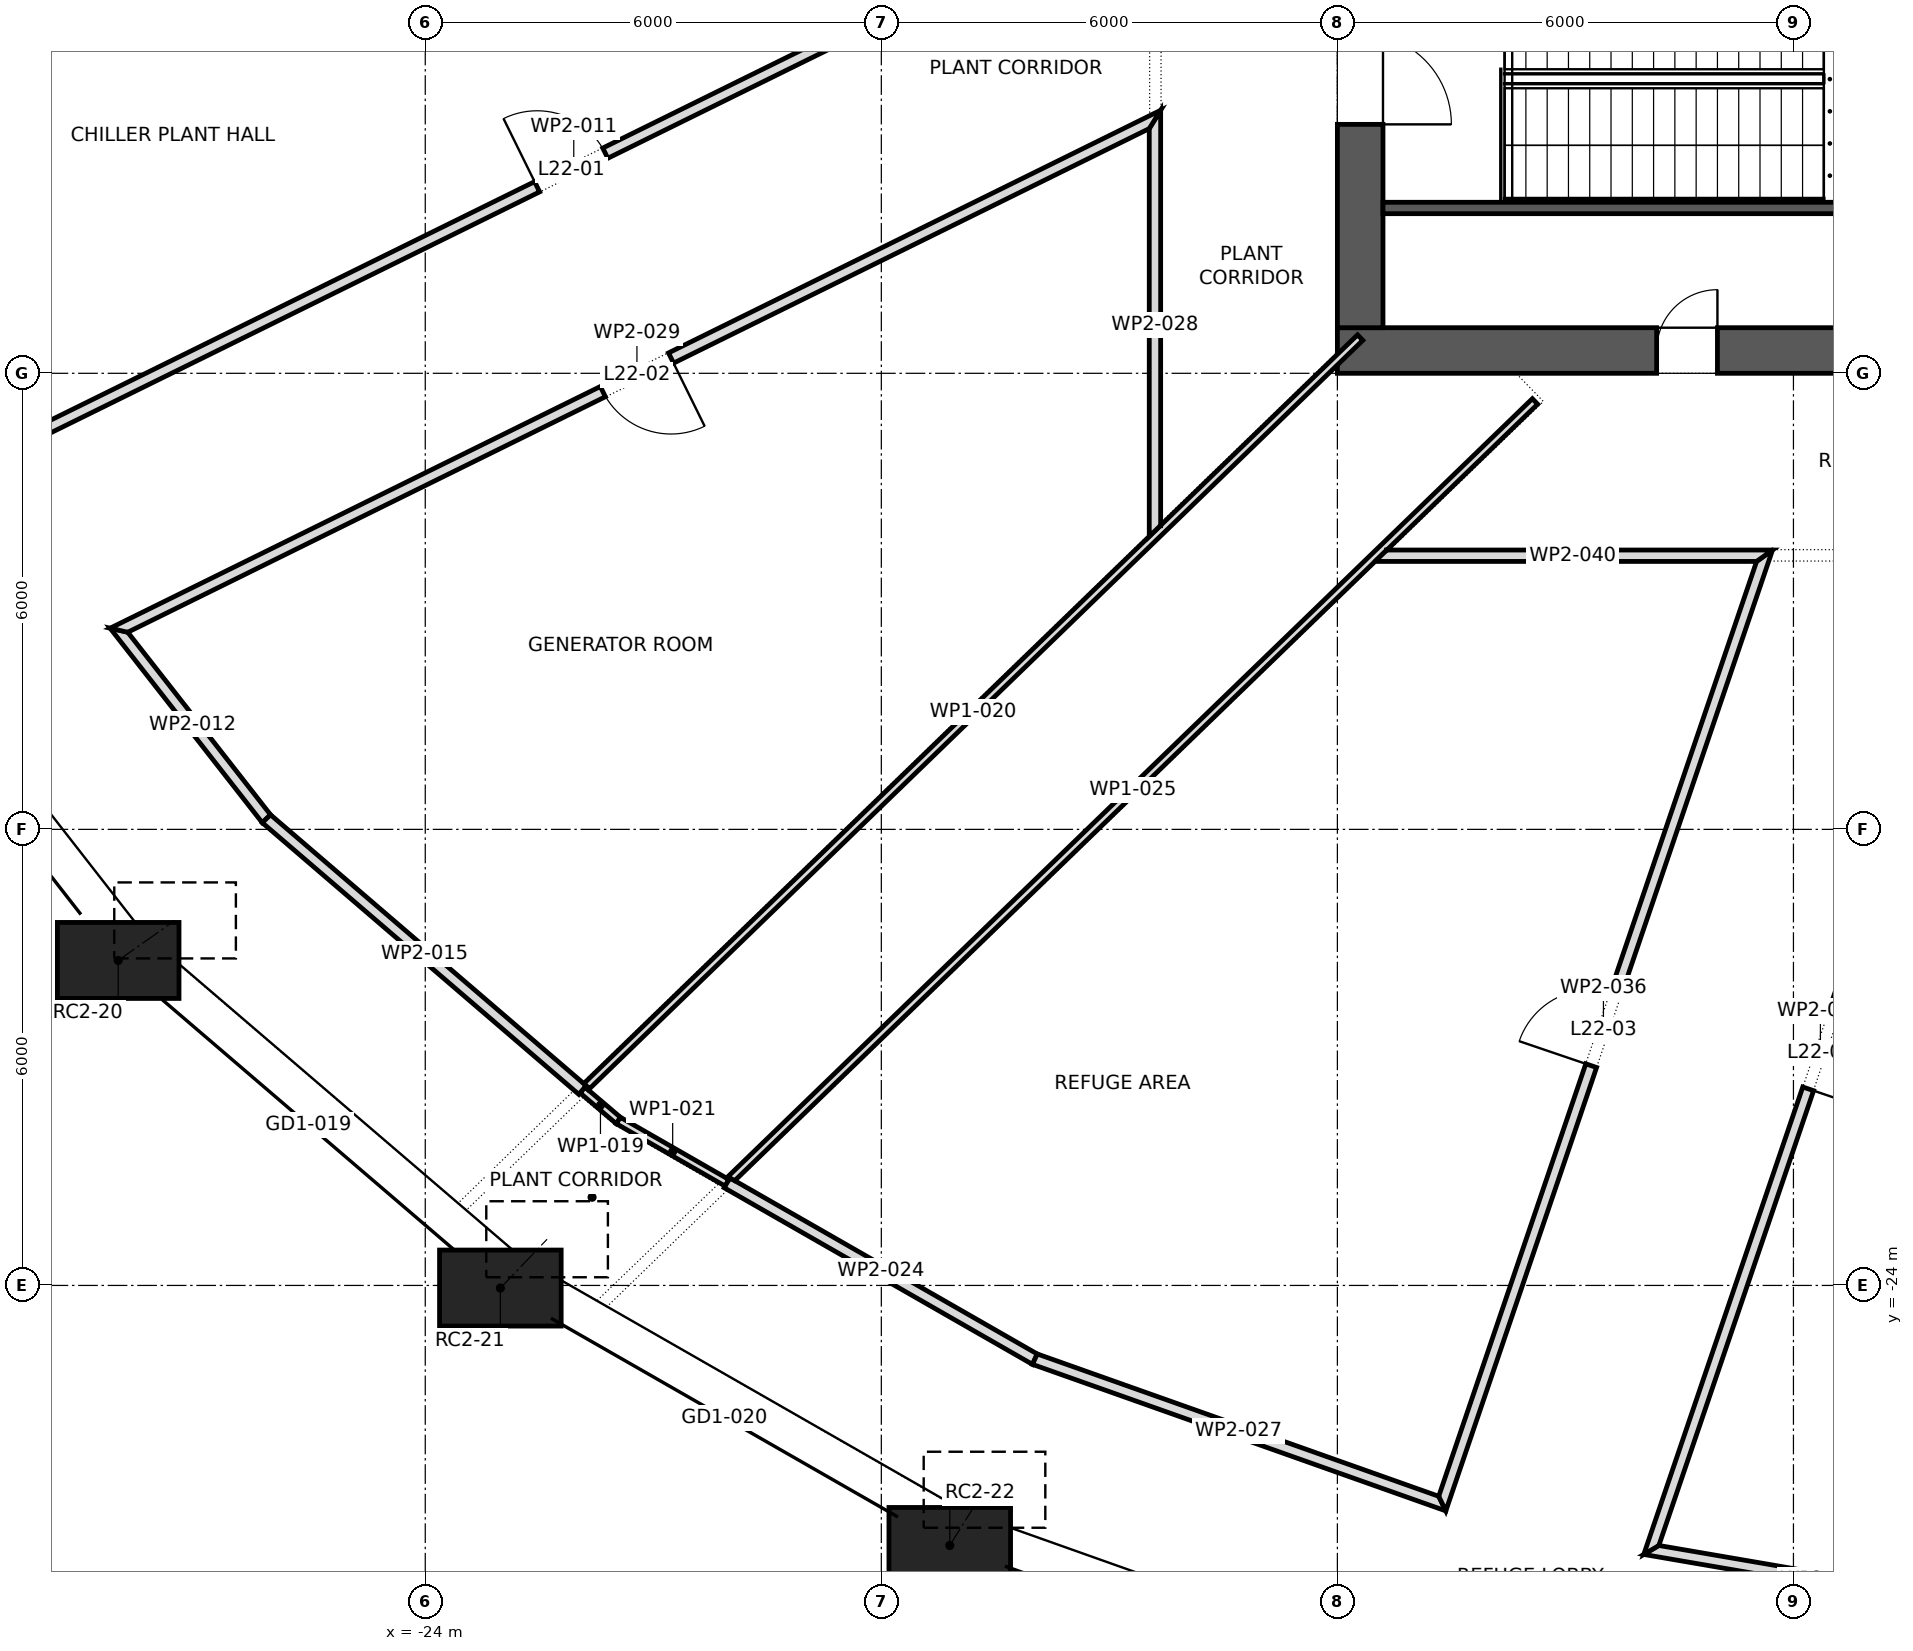
"""IFC4 building model, lengths in metres.
Left out: names, types, materials, properties, quantities, classifications, styles, units other than length and angle.
Written with IfcOpenShell. Run it as: python <this file> out.ifc"""

import sys

from ifc_helpers import new_model, si_unit, direction, frame, frame_2d, origin, origin_2d, place, context, subcontext, project, spatial, polyline, rectangle, outline, extrude, element, fill, save


model = new_model("IFC4")
c1 = context("Model", 3, precision=1e-05, world=origin(), true_north=direction((0.0, 1.0)))
c2 = subcontext(c1, "Body", "Model", "MODEL_VIEW")
j1 = project(units=[si_unit("LENGTHUNIT", "METRE"), si_unit("PLANEANGLEUNIT", "RADIAN")], contexts=[c1])
p1 = place(None, origin())
s1 = spatial("IfcSite", under=j1, at=p1, CompositionType="ELEMENT")
p2 = place(p1, origin())
s2 = spatial("IfcBuilding", under=s1, at=p2, CompositionType="ELEMENT")
p3 = place(p2, frame((0.0, 0.0, 99.1)))
s3 = spatial("IfcBuildingStorey", under=s2, at=p3, CompositionType="ELEMENT", Elevation=99.1)
p4 = place(p3, frame((-28.04, -19.724, 0.086), z_axis=(0.140981797412, 0.099170230088, 0.985032688931), x_axis=(-0.575341361803, 0.817913392358, 0.0)))
e1 = element("IfcColumn", 1, at=p4, inside=s3, PredefinedType="COLUMN", context=c2, shape_type="SweptSolid", body=[
    extrude(rectangle(XDim=1.6, YDim=1.0, at=origin_2d()), origin(), (0.0, 0.0, 1.0), 5.308),
])
p5 = place(p3, frame((-23.012, -24.034, 0.083), z_axis=(0.115812481815, 0.12096379157, 0.985877898213), x_axis=(-0.722319686129, 0.691559304059, 0.0)))
e2 = element("IfcColumn", 2, at=p5, inside=s3, PredefinedType="COLUMN", context=c2, shape_type="SweptSolid", body=[
    extrude(rectangle(XDim=1.6, YDim=1.0, at=origin_2d()), origin(), (0.0, 0.0, 1.0), 5.308),
])
p6 = place(p3, frame((-17.1, -27.421, 0.081), z_axis=(0.08609317292, 0.138107798226, 0.986668232815), x_axis=(-0.848616882571, 0.529007926798, 0.0)))
e3 = element("IfcColumn", 3, at=p6, inside=s3, PredefinedType="COLUMN", context=c2, shape_type="SweptSolid", body=[
    extrude(rectangle(XDim=1.6, YDim=1.0, at=origin_2d()), origin(), (0.0, 0.0, 1.0), 5.309),
])
p7 = place(p3, frame((-12.0, -11.7, 0.0), z_axis=(0.0, 0.0, 1.0), x_axis=(1.0, 0.0, 0.0)))
e4 = element("IfcWall", 4, at=p7, inside=s3, PredefinedType="SHEAR", context=c2, shape_type="SweptSolid", body=[
    extrude(rectangle(XDim=24.0, YDim=0.6, at=frame_2d((12.0, 0.0))), origin(), (0.0, 0.0, 1.0), 5.4),
])
p8 = place(p7, frame((10.025, 0.0, 0.0)))
e5 = element("IfcOpeningElement", 5, at=p8, cuts=e4, PredefinedType="OPENING", context=c2, shape_type="SweptSolid", body=[
    extrude(rectangle(XDim=0.8, YDim=2.1, at=frame_2d((0.4, 1.05))), frame((0.0, 0.312, 0.0), z_axis=(0.0, -1.0, 0.0), x_axis=(1.0, 0.0, 0.0)), (0.0, 0.0, 1.0), 0.624),
])
p9 = place(p7, frame((4.2, 0.0, 0.0)))
e6 = element("IfcOpeningElement", 6, at=p9, cuts=e4, PredefinedType="OPENING", context=c2, shape_type="SweptSolid", body=[
    extrude(rectangle(XDim=0.8, YDim=2.1, at=frame_2d((0.4, 1.05))), frame((0.0, 0.312, 0.0), z_axis=(0.0, -1.0, 0.0), x_axis=(1.0, 0.0, 0.0)), (0.0, 0.0, 1.0), 0.624),
])
p10 = place(p7, frame((15.85, 0.0, 0.0)))
e7 = element("IfcOpeningElement", 7, at=p10, cuts=e4, PredefinedType="OPENING", context=c2, shape_type="SweptSolid", body=[
    extrude(rectangle(XDim=0.8, YDim=2.1, at=frame_2d((0.4, 1.05))), frame((0.0, 0.312, 0.0), z_axis=(0.0, -1.0, 0.0), x_axis=(1.0, 0.0, 0.0)), (0.0, 0.0, 1.0), 0.624),
])
p11 = place(p3, frame((-11.7, -11.4, 0.0), z_axis=(0.0, 0.0, 1.0), x_axis=(0.0, 1.0, 0.0)))
e8 = element("IfcWall", 8, at=p11, inside=s3, PredefinedType="SHEAR", context=c2, shape_type="SweptSolid", body=[
    extrude(rectangle(XDim=22.8, YDim=0.6, at=frame_2d((11.4, 0.0))), origin(), (0.0, 0.0, 1.0), 5.4),
])
p12 = place(p11, frame((10.2, 0.0, 0.0)))
e9 = element("IfcOpeningElement", 9, at=p12, cuts=e8, PredefinedType="OPENING", context=c2, shape_type="SweptSolid", body=[
    extrude(rectangle(XDim=2.4, YDim=2.1, at=frame_2d((1.2, 1.05))), frame((0.0, 0.312, 0.0), z_axis=(0.0, -1.0, 0.0), x_axis=(1.0, 0.0, 0.0)), (0.0, 0.0, 1.0), 0.624),
])
p13 = place(p11, frame((18.925, 0.0, 0.0)))
e10 = element("IfcOpeningElement", 10, at=p13, cuts=e8, PredefinedType="OPENING", context=c2, shape_type="SweptSolid", body=[
    extrude(rectangle(XDim=1.2, YDim=2.1, at=frame_2d((0.6, 1.05))), frame((0.0, 0.312, 0.0), z_axis=(0.0, -1.0, 0.0), x_axis=(1.0, 0.0, 0.0)), (0.0, 0.0, 1.0), 0.624),
])
p14 = place(p11, frame((2.675, 0.0, 0.0)))
e11 = element("IfcOpeningElement", 11, at=p14, cuts=e8, PredefinedType="OPENING", context=c2, shape_type="SweptSolid", body=[
    extrude(rectangle(XDim=1.2, YDim=2.1, at=frame_2d((0.6, 1.05))), frame((0.0, 0.312, 0.0), z_axis=(0.0, -1.0, 0.0), x_axis=(1.0, 0.0, 0.0)), (0.0, 0.0, 1.0), 0.624),
])
p15 = place(p3, frame((-11.4, -9.825, 0.0), z_axis=(0.0, 0.0, 1.0), x_axis=(1.0, 0.0, 0.0)))
e12 = element("IfcWall", 12, at=p15, inside=s3, PredefinedType="SHEAR", context=c2, shape_type="SweptSolid", body=[
    extrude(rectangle(XDim=8.0, YDim=0.15, at=frame_2d((4.0, 0.0))), origin(), (0.0, 0.0, 1.0), 5.1),
])
p16 = place(p3, frame((-29.828, -13.143, 0.0), z_axis=(0.0, 0.0, 1.0), x_axis=(0.896984577942, 0.442061836098, 0.0)))
e13 = element("IfcWall", 13, at=p16, inside=s3, PredefinedType="PARTITIONING", context=c2, shape_type="SweptSolid", body=[
    extrude(outline(polyline([(17.275, 0.075), (15.372, 0.075), (13.469, 0.075), (11.567, 0.075), (9.664, 0.075), (7.762, 0.075), (5.859, 0.075), (3.957, 0.075), (2.054, 0.075), (0.151, 0.075), (0.0, -0.075), (1.919, -0.075), (3.839, -0.075), (5.758, -0.075), (7.678, -0.075), (9.597, -0.075), (11.517, -0.075), (13.436, -0.075), (15.355, -0.075), (17.275, -0.075), (17.275, 0.075)])), origin(), (0.0, 0.0, 1.0), 5.1),
])
p17 = place(p16, frame((8.138, 0.0, 0.0)))
e14 = element("IfcOpeningElement", 14, at=p17, cuts=e13, PredefinedType="OPENING", context=c2, shape_type="SweptSolid", body=[
    extrude(rectangle(XDim=1.0, YDim=2.1, at=frame_2d((0.5, 1.05))), frame((0.0, 0.087, 0.0), z_axis=(0.0, -1.0, 0.0), x_axis=(1.0, 0.0, 0.0)), (0.0, 0.0, 1.0), 0.174),
])
p18 = place(p3, frame((-28.087, -15.307, 0.0), z_axis=(0.0, 0.0, 1.0), x_axis=(0.616133967793, -0.787641373807, 0.0)))
e15 = element("IfcWall", 15, at=p18, inside=s3, PredefinedType="PARTITIONING", context=c2, shape_type="SweptSolid", body=[
    extrude(outline(polyline([(0.0, -0.075), (1.624, -0.075), (3.248, -0.075), (3.233, 0.075), (1.709, 0.075), (0.184, 0.075), (0.0, -0.075), (0.0, -0.075)])), origin(), (0.0, 0.0, 1.0), 5.1),
])
p19 = place(p3, frame((-26.096, -17.855, 0.0), z_axis=(0.0, 0.0, 1.0), x_axis=(0.758892304341, -0.651216147229, 0.0)))
e16 = element("IfcWall", 16, at=p19, inside=s3, PredefinedType="PARTITIONING", context=c2, shape_type="SweptSolid", body=[
    extrude(outline(polyline([(5.489, 0.075), (3.665, 0.075), (1.84, 0.075), (0.015, 0.075), (0.0, -0.075), (0.0, -0.075), (1.83, -0.075), (3.659, -0.075), (5.489, -0.075), (5.489, 0.075)])), origin(), (0.0, 0.0, 1.0), 5.1),
])
p20 = place(p3, frame((-21.93, -21.43, 0.0), z_axis=(0.0, 0.0, 1.0), x_axis=(0.761386795388, -0.648297885088, 0.0)))
e17 = element("IfcWall", 17, at=p20, inside=s3, PredefinedType="PARTITIONING", context=c2, shape_type="SweptSolid", body=[
    extrude(outline(polyline([(0.0, -0.05), (0.622, -0.05), (0.613, 0.05), (0.0, 0.05), (0.0, -0.05)])), origin(), (0.0, 0.0, 1.0), 5.1),
])
p21 = place(p3, frame((-21.89, -21.391, 0.0), z_axis=(0.0, 0.0, 1.0), x_axis=(0.718607137454, 0.695416265269, 0.0)))
e18 = element("IfcWall", 18, at=p21, inside=s3, PredefinedType="PARTITIONING", context=c2, shape_type="SweptSolid", body=[
    extrude(outline(polyline([(14.18, 0.05), (12.378, 0.05), (10.576, 0.05), (10.573, 0.047), (10.57, 0.05), (8.811, 0.05), (7.052, 0.05), (5.292, 0.05), (3.533, 0.05), (1.774, 0.05), (0.015, 0.05), (0.019, 0.007), (0.0, 0.005), (0.0, -0.05), (1.772, -0.05), (3.545, -0.05), (5.318, -0.05), (7.09, -0.05), (8.863, -0.05), (10.635, -0.05), (12.408, -0.05), (14.18, -0.05), (14.18, 0.05)])), origin(), (0.0, 0.0, 1.0), 5.1),
])
p22 = place(p3, frame((-21.464, -21.828, 0.0), z_axis=(0.0, 0.0, 1.0), x_axis=(0.867515133923, -0.497410788398, 0.0)))
e19 = element("IfcWall", 19, at=p22, inside=s3, PredefinedType="PARTITIONING", context=c2, shape_type="SweptSolid", body=[
    extrude(outline(polyline([(1.653, 0.05), (0.009, 0.05), (0.0, -0.05), (1.653, -0.05), (1.653, 0.05)])), origin(), (0.0, 0.0, 1.0), 5.1),
])
p23 = place(p3, frame((-20.03, -22.65, 0.0), z_axis=(0.0, 0.0, 1.0), x_axis=(0.867705864806, -0.497077994062, 0.0)))
e20 = element("IfcWall", 20, at=p23, inside=s3, PredefinedType="PARTITIONING", context=c2, shape_type="SweptSolid", body=[
    extrude(outline(polyline([(0.0, -0.075), (1.558, -0.075), (3.116, -0.075), (4.674, -0.075), (4.661, 0.075), (3.107, 0.075), (1.553, 0.075), (0.0, 0.075), (0.0, -0.075)])), origin(), (0.0, 0.0, 1.0), 5.1),
])
p24 = place(p3, frame((-20.003, -22.624, 0.0), z_axis=(0.0, 0.0, 1.0), x_axis=(0.718850780889, 0.695164408478, 0.0)))
e21 = element("IfcWall", 21, at=p24, inside=s3, PredefinedType="PARTITIONING", context=c2, shape_type="SweptSolid", body=[
    extrude(outline(polyline([(0.054, -0.05), (2.043, -0.05), (4.031, -0.05), (6.02, -0.05), (8.008, -0.05), (9.997, -0.05), (11.985, -0.05), (11.987, -0.048), (11.989, -0.05), (13.369, -0.05), (14.75, -0.05), (14.75, 0.05), (12.906, 0.05), (11.062, 0.05), (9.219, 0.05), (7.375, 0.05), (5.531, 0.05), (3.688, 0.05), (1.844, 0.05), (0.0, 0.05), (0.0, 0.049), (0.01, 0.014), (0.034, 0.021), (0.054, -0.05)])), origin(), (0.0, 0.0, 1.0), 5.1),
])
p25 = place(p3, frame((-15.986, -24.968, 0.0), z_axis=(0.0, 0.0, 1.0), x_axis=(0.94253008703, -0.334121287923, 0.0)))
e22 = element("IfcWall", 22, at=p25, inside=s3, PredefinedType="PARTITIONING", context=c2, shape_type="SweptSolid", body=[
    extrude(outline(polyline([(0.0, -0.075), (1.923, -0.075), (3.846, -0.075), (5.77, -0.075), (5.618, 0.075), (3.75, 0.075), (1.882, 0.075), (0.013, 0.075), (0.0, -0.074), (0.0, -0.075)])), origin(), (0.0, 0.0, 1.0), 5.1),
])
p26 = place(p3, frame((-14.4, -14.147, 0.0), z_axis=(0.0, 0.0, 1.0), x_axis=(0.0, 1.0, 0.0)))
e23 = element("IfcWall", 23, at=p26, inside=s3, PredefinedType="PARTITIONING", context=c2, shape_type="SweptSolid", body=[
    extrude(outline(polyline([(0.146, -0.075), (1.967, -0.075), (3.787, -0.075), (5.608, -0.075), (5.487, 0.0), (5.367, 0.075), (3.578, 0.075), (1.79, 0.075), (0.001, 0.075), (0.146, -0.075)])), origin(), (0.0, 0.0, 1.0), 5.1),
])
p27 = place(p3, frame((-14.292, -8.607, 0.0), z_axis=(0.0, 0.0, 1.0), x_axis=(-0.896913310142, -0.442206415703, 0.0)))
e24 = element("IfcWall", 24, at=p27, inside=s3, PredefinedType="PARTITIONING", context=c2, shape_type="SweptSolid", body=[
    extrude(outline(polyline([(0.0, -0.075), (1.926, -0.075), (3.853, -0.075), (5.779, -0.075), (7.705, -0.075), (9.631, -0.075), (11.557, -0.075), (13.483, -0.075), (15.409, -0.075), (15.225, 0.075), (13.352, 0.075), (11.479, 0.075), (9.606, 0.075), (7.733, 0.075), (5.86, 0.075), (3.987, 0.075), (2.114, 0.075), (0.241, 0.075), (0.0, -0.075)])), origin(), (0.0, 0.0, 1.0), 5.1),
])
p28 = place(p27, frame((7.219, 0.0, 0.0)))
e25 = element("IfcOpeningElement", 25, at=p28, cuts=e24, PredefinedType="OPENING", context=c2, shape_type="SweptSolid", body=[
    extrude(rectangle(XDim=1.0, YDim=2.1, at=frame_2d((0.5, 1.05))), frame((0.0, 0.087, 0.0), z_axis=(0.0, -1.0, 0.0), x_axis=(1.0, 0.0, 0.0)), (0.0, 0.0, 1.0), 0.174),
])
p29 = place(p3, frame((-10.645, -26.942, 0.0), z_axis=(0.0, 0.0, 1.0), x_axis=(0.321926990849, 0.946764496886, 0.0)))
e26 = element("IfcWall", 26, at=p29, inside=s3, PredefinedType="PARTITIONING", context=c2, shape_type="SweptSolid", body=[
    extrude(outline(polyline([(13.352, -0.075), (13.352, -0.075), (13.143, 0.075), (11.287, 0.075), (9.431, 0.075), (7.575, 0.075), (5.719, 0.075), (3.864, 0.075), (2.008, 0.075), (0.152, 0.075), (0.0, -0.075), (1.907, -0.075), (3.815, -0.075), (5.722, -0.075), (7.63, -0.075), (9.537, -0.075), (11.444, -0.075), (13.352, -0.075)])), origin(), (0.0, 0.0, 1.0), 5.1),
])
p30 = place(p29, frame((6.162, 0.0, 0.0)))
e27 = element("IfcOpeningElement", 27, at=p30, cuts=e26, PredefinedType="OPENING", context=c2, shape_type="SweptSolid", body=[
    extrude(rectangle(XDim=1.0, YDim=2.1, at=frame_2d((0.5, 1.05))), frame((0.0, 0.087, 0.0), z_axis=(0.0, -1.0, 0.0), x_axis=(1.0, 0.0, 0.0)), (0.0, 0.0, 1.0), 0.174),
])
p31 = place(p3, frame((-7.957, -27.465, 0.0), z_axis=(0.0, 0.0, 1.0), x_axis=(0.985561893729, -0.169315544559, 0.0)))
e28 = element("IfcWall", 28, at=p31, inside=s3, PredefinedType="PARTITIONING", context=c2, shape_type="SweptSolid", body=[
    extrude(outline(polyline([(4.701, -0.075), (4.701, -0.074), (4.688, 0.075), (3.184, 0.075), (1.68, 0.075), (0.176, 0.075), (0.0, -0.075), (1.567, -0.075), (3.134, -0.075), (4.701, -0.075)])), origin(), (0.0, 0.0, 1.0), 5.1),
])
p32 = place(p3, frame((-6.275, -14.4, 0.0), z_axis=(0.0, 0.0, 1.0), x_axis=(-1.0, 0.0, 0.0)))
e29 = element("IfcWall", 29, at=p32, inside=s3, PredefinedType="PARTITIONING", context=c2, shape_type="SweptSolid", body=[
    extrude(outline(polyline([(0.0, -0.075), (1.691, -0.075), (3.383, -0.075), (5.074, -0.075), (5.229, 0.075), (5.229, 0.075), (3.556, 0.075), (1.882, 0.075), (0.209, 0.075), (0.104, 0.0), (0.0, -0.075), (0.0, -0.075)])), origin(), (0.0, 0.0, 1.0), 5.1),
])
p33 = place(p3, frame((-3.403, -14.349, 0.0), z_axis=(0.0, 0.0, 1.0), x_axis=(-0.32208303293, -0.946711423771, 0.0)))
e30 = element("IfcWall", 30, at=p33, inside=s3, PredefinedType="PARTITIONING", context=c2, shape_type="SweptSolid", body=[
    extrude(outline(polyline([(0.0, -0.075), (1.994, -0.075), (3.988, -0.075), (5.982, -0.075), (7.976, -0.075), (9.97, -0.075), (11.964, -0.075), (13.958, -0.075), (13.782, 0.075), (11.829, 0.075), (9.875, 0.075), (7.922, 0.075), (5.968, 0.075), (4.015, 0.075), (2.061, 0.075), (0.107, 0.075), (0.0, -0.075)])), origin(), (0.0, 0.0, 1.0), 5.1),
])
p34 = place(p33, frame((6.462, 0.0, 0.0)))
e31 = element("IfcOpeningElement", 31, at=p34, cuts=e30, PredefinedType="OPENING", context=c2, shape_type="SweptSolid", body=[
    extrude(rectangle(XDim=1.0, YDim=2.1, at=frame_2d((0.5, 1.05))), frame((0.0, 0.087, 0.0), z_axis=(0.0, -1.0, 0.0), x_axis=(1.0, 0.0, 0.0)), (0.0, 0.0, 1.0), 0.174),
])
p35 = place(p14, frame((1.2, 0.0, 0.0), z_axis=(0.0, 0.0, 1.0), x_axis=(-1.0, 0.0, 0.0)))
e32 = element("IfcDoor", 32, at=p35, inside=s3, OperationType="SINGLE_SWING_LEFT", PredefinedType="DOOR", context=c2, shape_type="SweptSolid", body=[
    extrude(rectangle(XDim=1.2, YDim=2.1, at=frame_2d((0.6, 1.05))), frame((0.0, 0.025, 0.0), z_axis=(0.0, -1.0, 0.0), x_axis=(1.0, 0.0, 0.0)), (0.0, 0.0, 1.0), 0.05),
])
fill(e11, e32)
p36 = place(p9, origin())
e33 = element("IfcDoor", 33, at=p36, inside=s3, OperationType="SINGLE_SWING_LEFT", PredefinedType="DOOR", context=c2, shape_type="SweptSolid", body=[
    extrude(rectangle(XDim=0.8, YDim=2.1, at=frame_2d((0.4, 1.05))), frame((0.0, 0.025, 0.0), z_axis=(0.0, -1.0, 0.0), x_axis=(1.0, 0.0, 0.0)), (0.0, 0.0, 1.0), 0.05),
])
fill(e6, e33)
p37 = place(p17, origin())
e34 = element("IfcDoor", 34, at=p37, inside=s3, OperationType="SINGLE_SWING_RIGHT", PredefinedType="DOOR", context=c2, shape_type="SweptSolid", body=[
    extrude(rectangle(XDim=1.0, YDim=2.1, at=frame_2d((0.5, 1.05))), frame((0.0, 0.025, 0.0), z_axis=(0.0, -1.0, 0.0), x_axis=(1.0, 0.0, 0.0)), (0.0, 0.0, 1.0), 0.05),
])
fill(e14, e34)
p38 = place(p28, origin())
e35 = element("IfcDoor", 35, at=p38, inside=s3, OperationType="SINGLE_SWING_RIGHT", PredefinedType="DOOR", context=c2, shape_type="SweptSolid", body=[
    extrude(rectangle(XDim=1.0, YDim=2.1, at=frame_2d((0.5, 1.05))), frame((0.0, 0.025, 0.0), z_axis=(0.0, -1.0, 0.0), x_axis=(1.0, 0.0, 0.0)), (0.0, 0.0, 1.0), 0.05),
])
fill(e25, e35)
p39 = place(p30, origin())
e36 = element("IfcDoor", 36, at=p39, inside=s3, OperationType="SINGLE_SWING_RIGHT", PredefinedType="DOOR", context=c2, shape_type="SweptSolid", body=[
    extrude(rectangle(XDim=1.0, YDim=2.1, at=frame_2d((0.5, 1.05))), frame((0.0, 0.025, 0.0), z_axis=(0.0, -1.0, 0.0), x_axis=(1.0, 0.0, 0.0)), (0.0, 0.0, 1.0), 0.05),
])
fill(e27, e36)
p40 = place(p34, origin())
e37 = element("IfcDoor", 37, at=p40, inside=s3, OperationType="SINGLE_SWING_LEFT", PredefinedType="DOOR", context=c2, shape_type="SweptSolid", body=[
    extrude(rectangle(XDim=1.0, YDim=2.1, at=frame_2d((0.5, 1.05))), frame((0.0, 0.025, 0.0), z_axis=(0.0, -1.0, 0.0), x_axis=(1.0, 0.0, 0.0)), (0.0, 0.0, 1.0), 0.05),
])
fill(e31, e37)
save(model, sys.argv[1])
